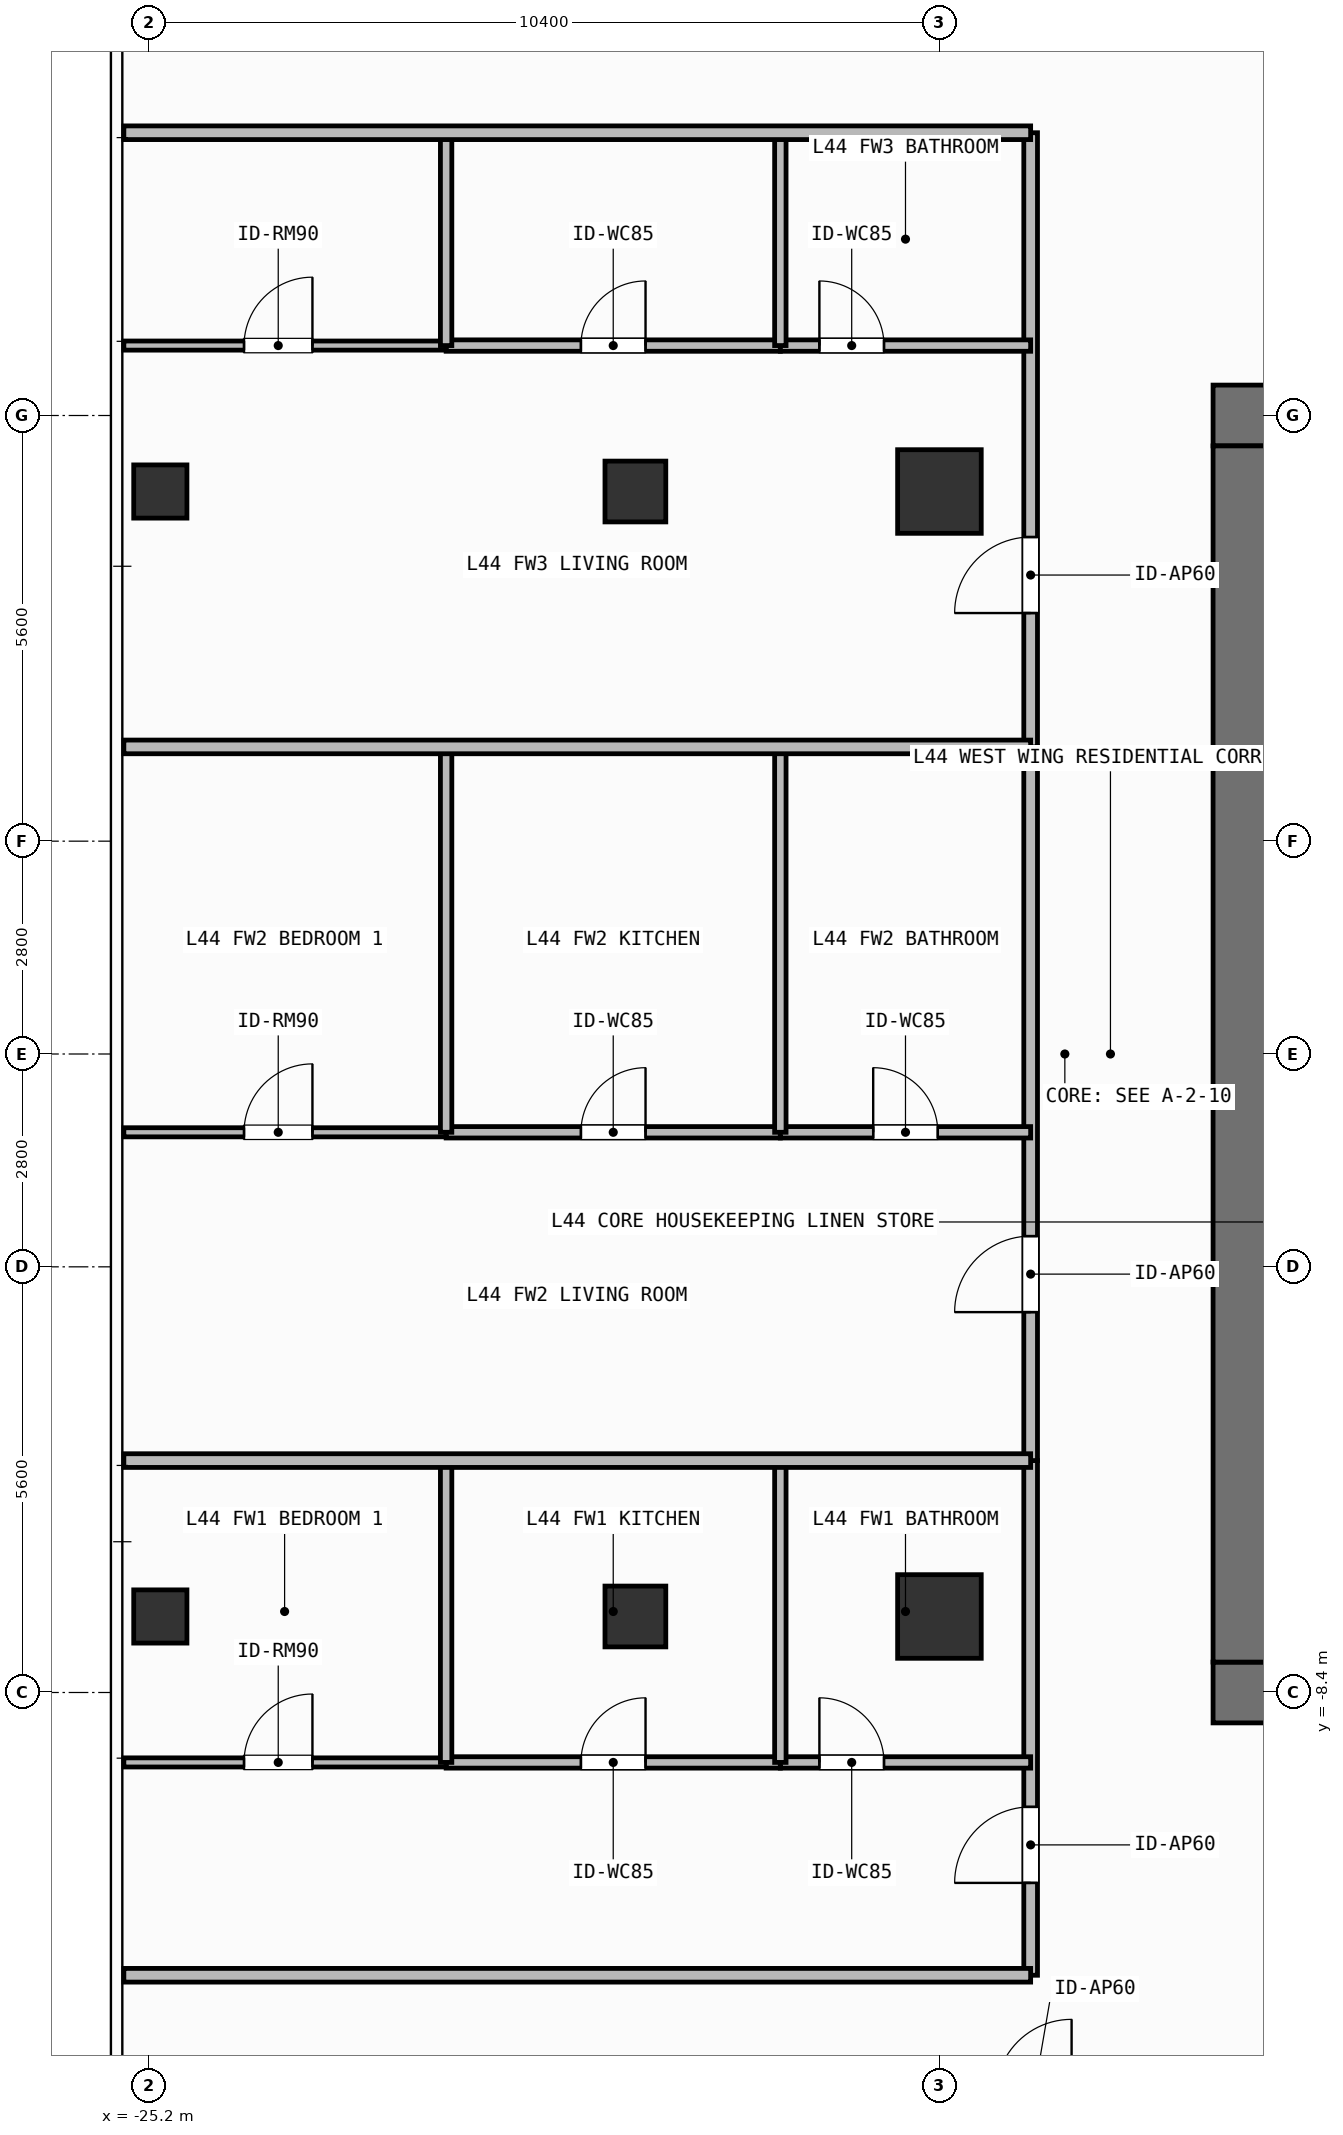
"""IFC4 building model, lengths in metres.
Left out: names, types, materials, properties, quantities, classifications, styles, units other than length and angle.
Written with IfcOpenShell. Run it as: python <this file> out.ifc"""

import sys

from ifc_helpers import new_model, si_unit, direction, frame, frame_2d, origin, origin_2d, place, context, subcontext, project, spatial, rectangle, hollow_rectangle, extrude, element, fill, save


model = new_model("IFC4")
c1 = context("Model", 3, precision=1e-05, world=origin(), true_north=direction((0.0, 1.0)))
c2 = subcontext(c1, "Body", "Model", "MODEL_VIEW")
j1 = project(units=[si_unit("LENGTHUNIT", "METRE"), si_unit("PLANEANGLEUNIT", "RADIAN")], contexts=[c1])
p1 = place(None, origin())
s1 = spatial("IfcSite", under=j1, at=p1, CompositionType="ELEMENT")
p2 = place(p1, origin())
s2 = spatial("IfcBuilding", under=s1, at=p2, CompositionType="ELEMENT")
p3 = place(p2, frame((0.0, 0.0, 179.7)))
s3 = spatial("IfcBuildingStorey", under=s2, at=p3, CompositionType="ELEMENT", Elevation=179.7)
for number, where, z_axis, x_axis in (
    (1, (-11.2, -8.4, 0.0), (0.0, 0.0, 1.0), (1.0, 0.0, 0.0)),
    (2, (-11.2, 8.4, 0.0), (0.0, 0.0, 1.0), (1.0, 0.0, 0.0)),
):
    element("IfcWall", number, at=place(p3, frame(where, z_axis=z_axis, x_axis=x_axis)), inside=s3, PredefinedType="SHEAR", context=c2, shape_type="SweptSolid", body=[
        extrude(rectangle(XDim=1.5, YDim=0.8, at=frame_2d((0.75, 0.0))), origin(), (0.0, 0.0, 1.0), 3.9),
    ])
p4 = place(p3, frame((-10.8, -8.0, 0.0), z_axis=(0.0, 0.0, 1.0), x_axis=(0.0, 1.0, 0.0)))
e3 = element("IfcWall", 3, at=p4, inside=s3, PredefinedType="SHEAR", context=c2, shape_type="SweptSolid", body=[
    extrude(rectangle(XDim=16.0, YDim=0.8, at=frame_2d((8.0, 0.0))), origin(), (0.0, 0.0, 1.0), 3.9),
])
for number, where, z_axis, x_axis in (
    (4, (-14.8, -7.4, 0.0), (0.0, 0.0, 1.0), (1.0, 0.0, 0.0)),
    (5, (-14.8, 7.4, 0.0), (0.0, 0.0, 1.0), (1.0, 0.0, 0.0)),
):
    element("IfcColumn", number, at=place(p3, frame(where, z_axis=z_axis, x_axis=x_axis)), inside=s3, PredefinedType="COLUMN", context=c2, shape_type="SweptSolid", body=[
        extrude(rectangle(XDim=1.1, YDim=1.1, at=origin_2d()), origin(), (0.0, 0.0, 1.0), 3.9),
    ])
for number, where, z_axis, x_axis in (
    (6, (-18.8, -7.4, 0.0), (0.0, 0.0, 1.0), (1.0, 0.0, 0.0)),
    (7, (-18.8, 7.4, 0.0), (0.0, 0.0, 1.0), (1.0, 0.0, 0.0)),
):
    element("IfcColumn", number, at=place(p3, frame(where, z_axis=z_axis, x_axis=x_axis)), inside=s3, PredefinedType="COLUMN", context=c2, shape_type="SweptSolid", body=[
        extrude(hollow_rectangle(XDim=0.8, YDim=0.8, WallThickness=0.036, at=origin_2d()), origin(), (0.0, 0.0, 1.0), 3.9),
    ])
for number, where, z_axis, x_axis in (
    (8, (-25.05, -7.4, 0.0), (0.0, 0.0, 1.0), (1.0, 0.0, 0.0)),
    (9, (-25.05, 7.4, 0.0), (0.0, 0.0, 1.0), (1.0, 0.0, 0.0)),
):
    element("IfcColumn", number, at=place(p3, frame(where, z_axis=z_axis, x_axis=x_axis)), inside=s3, PredefinedType="COLUMN", context=c2, shape_type="SweptSolid", body=[
        extrude(hollow_rectangle(XDim=0.7, YDim=0.7, WallThickness=0.032, at=origin_2d()), origin(), (0.0, 0.0, 1.0), 3.9),
    ])
p5 = place(p3, frame((-13.6, -12.12, 0.0), z_axis=(0.0, 0.0, 1.0), x_axis=(0.0, 1.0, 0.0)))
e10 = element("IfcWall", 10, at=p5, inside=s3, PredefinedType="PARTITIONING", context=c2, shape_type="SweptSolid", body=[
    extrude(rectangle(XDim=6.771, YDim=0.18, at=frame_2d((3.385, 0.0))), origin(), (0.0, 0.0, 1.0), 3.68),
])
p6 = place(p5, frame((1.215, 0.0, 0.0)))
e11 = element("IfcOpeningElement", 11, at=p6, cuts=e10, PredefinedType="OPENING", context=c2, shape_type="SweptSolid", body=[
    extrude(rectangle(XDim=1.0, YDim=2.2, at=frame_2d((0.5, 1.1))), frame((0.0, 0.1, 0.0), z_axis=(0.0, -1.0, 0.0), x_axis=(1.0, 0.0, 0.0)), (0.0, 0.0, 1.0), 0.2),
])
p7 = place(p3, frame((-21.29, -9.32, 0.0), z_axis=(0.0, 0.0, 1.0), x_axis=(1.0, 0.0, 0.0)))
e12 = element("IfcWall", 12, at=p7, inside=s3, PredefinedType="PARTITIONING", context=c2, shape_type="SweptSolid", body=[
    extrude(rectangle(XDim=4.397, YDim=0.15, at=frame_2d((2.198, 0.0))), origin(), (0.0, 0.0, 1.0), 3.68),
])
p8 = place(p7, frame((1.773, 0.0, 0.0)))
e13 = element("IfcOpeningElement", 13, at=p8, cuts=e12, PredefinedType="OPENING", context=c2, shape_type="SweptSolid", body=[
    extrude(rectangle(XDim=0.85, YDim=2.1, at=frame_2d((0.425, 1.05))), frame((0.0, 0.085, 0.0), z_axis=(0.0, -1.0, 0.0), x_axis=(1.0, 0.0, 0.0)), (0.0, 0.0, 1.0), 0.17),
])
p9 = place(p3, frame((-16.893, -9.32, 0.0), z_axis=(0.0, 0.0, 1.0), x_axis=(1.0, 0.0, 0.0)))
e14 = element("IfcWall", 14, at=p9, inside=s3, PredefinedType="PARTITIONING", context=c2, shape_type="SweptSolid", body=[
    extrude(rectangle(XDim=3.293, YDim=0.15, at=frame_2d((1.646, 0.0))), origin(), (0.0, 0.0, 1.0), 3.68),
])
p10 = place(p9, frame((0.514, 0.0, 0.0)))
e15 = element("IfcOpeningElement", 15, at=p10, cuts=e14, PredefinedType="OPENING", context=c2, shape_type="SweptSolid", body=[
    extrude(rectangle(XDim=0.85, YDim=2.1, at=frame_2d((0.425, 1.05))), frame((0.0, 0.085, 0.0), z_axis=(0.0, -1.0, 0.0), x_axis=(1.0, 0.0, 0.0)), (0.0, 0.0, 1.0), 0.17),
])
p11 = place(p3, frame((-25.53, -9.32, 0.0), z_axis=(0.0, 0.0, 1.0), x_axis=(1.0, 0.0, 0.0)))
e16 = element("IfcWall", 16, at=p11, inside=s3, PredefinedType="PARTITIONING", context=c2, shape_type="SweptSolid", body=[
    extrude(rectangle(XDim=4.24, YDim=0.12, at=frame_2d((2.12, 0.0))), origin(), (0.0, 0.0, 1.0), 3.68),
])
p12 = place(p11, frame((1.581, 0.0, 0.0)))
e17 = element("IfcOpeningElement", 17, at=p12, cuts=e16, PredefinedType="OPENING", context=c2, shape_type="SweptSolid", body=[
    extrude(rectangle(XDim=0.9, YDim=2.1, at=frame_2d((0.45, 1.05))), frame((0.0, 0.07, 0.0), z_axis=(0.0, -1.0, 0.0), x_axis=(1.0, 0.0, 0.0)), (0.0, 0.0, 1.0), 0.14),
])
p13 = place(p3, frame((-13.6, -5.349, 0.0), z_axis=(0.0, 0.0, 1.0), x_axis=(0.0, 1.0, 0.0)))
e18 = element("IfcWall", 18, at=p13, inside=s3, PredefinedType="PARTITIONING", context=c2, shape_type="SweptSolid", body=[
    extrude(rectangle(XDim=9.389, YDim=0.18, at=frame_2d((4.695, 0.0))), origin(), (0.0, 0.0, 1.0), 3.68),
])
p14 = place(p13, frame((1.953, 0.0, 0.0)))
e19 = element("IfcOpeningElement", 19, at=p14, cuts=e18, PredefinedType="OPENING", context=c2, shape_type="SweptSolid", body=[
    extrude(rectangle(XDim=1.0, YDim=2.2, at=frame_2d((0.5, 1.1))), frame((0.0, 0.1, 0.0), z_axis=(0.0, -1.0, 0.0), x_axis=(1.0, 0.0, 0.0)), (0.0, 0.0, 1.0), 0.2),
])
p15 = place(p3, frame((-21.29, -1.03, 0.0), z_axis=(0.0, 0.0, 1.0), x_axis=(1.0, 0.0, 0.0)))
e20 = element("IfcWall", 20, at=p15, inside=s3, PredefinedType="PARTITIONING", context=c2, shape_type="SweptSolid", body=[
    extrude(rectangle(XDim=4.397, YDim=0.15, at=frame_2d((2.198, 0.0))), origin(), (0.0, 0.0, 1.0), 3.68),
])
p16 = place(p15, frame((1.773, 0.0, 0.0)))
e21 = element("IfcOpeningElement", 21, at=p16, cuts=e20, PredefinedType="OPENING", context=c2, shape_type="SweptSolid", body=[
    extrude(rectangle(XDim=0.85, YDim=2.1, at=frame_2d((0.425, 1.05))), frame((0.0, 0.085, 0.0), z_axis=(0.0, -1.0, 0.0), x_axis=(1.0, 0.0, 0.0)), (0.0, 0.0, 1.0), 0.17),
])
p17 = place(p3, frame((-16.893, -1.03, 0.0), z_axis=(0.0, 0.0, 1.0), x_axis=(1.0, 0.0, 0.0)))
e22 = element("IfcWall", 22, at=p17, inside=s3, PredefinedType="PARTITIONING", context=c2, shape_type="SweptSolid", body=[
    extrude(rectangle(XDim=3.293, YDim=0.15, at=frame_2d((1.646, 0.0))), origin(), (0.0, 0.0, 1.0), 3.68),
])
p18 = place(p17, frame((1.221, 0.0, 0.0)))
e23 = element("IfcOpeningElement", 23, at=p18, cuts=e22, PredefinedType="OPENING", context=c2, shape_type="SweptSolid", body=[
    extrude(rectangle(XDim=0.85, YDim=2.1, at=frame_2d((0.425, 1.05))), frame((0.0, 0.085, 0.0), z_axis=(0.0, -1.0, 0.0), x_axis=(1.0, 0.0, 0.0)), (0.0, 0.0, 1.0), 0.17),
])
p19 = place(p3, frame((-25.53, -1.03, 0.0), z_axis=(0.0, 0.0, 1.0), x_axis=(1.0, 0.0, 0.0)))
e24 = element("IfcWall", 24, at=p19, inside=s3, PredefinedType="PARTITIONING", context=c2, shape_type="SweptSolid", body=[
    extrude(rectangle(XDim=4.24, YDim=0.12, at=frame_2d((2.12, 0.0))), origin(), (0.0, 0.0, 1.0), 3.68),
])
p20 = place(p19, frame((1.581, 0.0, 0.0)))
e25 = element("IfcOpeningElement", 25, at=p20, cuts=e24, PredefinedType="OPENING", context=c2, shape_type="SweptSolid", body=[
    extrude(rectangle(XDim=0.9, YDim=2.1, at=frame_2d((0.45, 1.05))), frame((0.0, 0.07, 0.0), z_axis=(0.0, -1.0, 0.0), x_axis=(1.0, 0.0, 0.0)), (0.0, 0.0, 1.0), 0.14),
])
p21 = place(p3, frame((-13.6, 4.04, 0.0), z_axis=(0.0, 0.0, 1.0), x_axis=(0.0, 1.0, 0.0)))
e26 = element("IfcWall", 26, at=p21, inside=s3, PredefinedType="PARTITIONING", context=c2, shape_type="SweptSolid", body=[
    extrude(rectangle(XDim=8.08, YDim=0.18, at=frame_2d((4.04, 0.0))), origin(), (0.0, 0.0, 1.0), 3.68),
])
p22 = place(p21, frame((1.761, 0.0, 0.0)))
e27 = element("IfcOpeningElement", 27, at=p22, cuts=e26, PredefinedType="OPENING", context=c2, shape_type="SweptSolid", body=[
    extrude(rectangle(XDim=1.0, YDim=2.2, at=frame_2d((0.5, 1.1))), frame((0.0, 0.1, 0.0), z_axis=(0.0, -1.0, 0.0), x_axis=(1.0, 0.0, 0.0)), (0.0, 0.0, 1.0), 0.2),
])
p23 = place(p3, frame((-21.29, 9.32, 0.0), z_axis=(0.0, 0.0, 1.0), x_axis=(1.0, 0.0, 0.0)))
e28 = element("IfcWall", 28, at=p23, inside=s3, PredefinedType="PARTITIONING", context=c2, shape_type="SweptSolid", body=[
    extrude(rectangle(XDim=4.397, YDim=0.15, at=frame_2d((2.198, 0.0))), origin(), (0.0, 0.0, 1.0), 3.68),
])
p24 = place(p23, frame((1.773, 0.0, 0.0)))
e29 = element("IfcOpeningElement", 29, at=p24, cuts=e28, PredefinedType="OPENING", context=c2, shape_type="SweptSolid", body=[
    extrude(rectangle(XDim=0.85, YDim=2.1, at=frame_2d((0.425, 1.05))), frame((0.0, 0.085, 0.0), z_axis=(0.0, -1.0, 0.0), x_axis=(1.0, 0.0, 0.0)), (0.0, 0.0, 1.0), 0.17),
])
p25 = place(p3, frame((-16.893, 9.32, 0.0), z_axis=(0.0, 0.0, 1.0), x_axis=(1.0, 0.0, 0.0)))
e30 = element("IfcWall", 30, at=p25, inside=s3, PredefinedType="PARTITIONING", context=c2, shape_type="SweptSolid", body=[
    extrude(rectangle(XDim=3.293, YDim=0.15, at=frame_2d((1.646, 0.0))), origin(), (0.0, 0.0, 1.0), 3.68),
])
p26 = place(p25, frame((0.514, 0.0, 0.0)))
e31 = element("IfcOpeningElement", 31, at=p26, cuts=e30, PredefinedType="OPENING", context=c2, shape_type="SweptSolid", body=[
    extrude(rectangle(XDim=0.85, YDim=2.1, at=frame_2d((0.425, 1.05))), frame((0.0, 0.085, 0.0), z_axis=(0.0, -1.0, 0.0), x_axis=(1.0, 0.0, 0.0)), (0.0, 0.0, 1.0), 0.17),
])
p27 = place(p3, frame((-25.53, 9.32, 0.0), z_axis=(0.0, 0.0, 1.0), x_axis=(1.0, 0.0, 0.0)))
e32 = element("IfcWall", 32, at=p27, inside=s3, PredefinedType="PARTITIONING", context=c2, shape_type="SweptSolid", body=[
    extrude(rectangle(XDim=4.24, YDim=0.12, at=frame_2d((2.12, 0.0))), origin(), (0.0, 0.0, 1.0), 3.68),
])
p28 = place(p27, frame((1.581, 0.0, 0.0)))
e33 = element("IfcOpeningElement", 33, at=p28, cuts=e32, PredefinedType="OPENING", context=c2, shape_type="SweptSolid", body=[
    extrude(rectangle(XDim=0.9, YDim=2.1, at=frame_2d((0.45, 1.05))), frame((0.0, 0.07, 0.0), z_axis=(0.0, -1.0, 0.0), x_axis=(1.0, 0.0, 0.0)), (0.0, 0.0, 1.0), 0.14),
])
for number, where, z_axis, x_axis in (
    (34, (-16.893, -9.32, 0.0), (0.0, 0.0, 1.0), (0.0, 1.0, 0.0)),
    (35, (-21.29, -9.32, 0.0), (0.0, 0.0, 1.0), (0.0, 1.0, 0.0)),
):
    element("IfcWall", number, at=place(p3, frame(where, z_axis=z_axis, x_axis=x_axis)), inside=s3, PredefinedType="PARTITIONING", context=c2, shape_type="SweptSolid", body=[
        extrude(rectangle(XDim=3.971, YDim=0.15, at=frame_2d((1.985, 0.0))), origin(), (0.0, 0.0, 1.0), 3.68),
    ])
for number, where, z_axis, x_axis in (
    (36, (-16.893, -1.03, 0.0), (0.0, 0.0, 1.0), (0.0, 1.0, 0.0)),
    (37, (-21.29, -1.03, 0.0), (0.0, 0.0, 1.0), (0.0, 1.0, 0.0)),
):
    element("IfcWall", number, at=place(p3, frame(where, z_axis=z_axis, x_axis=x_axis)), inside=s3, PredefinedType="PARTITIONING", context=c2, shape_type="SweptSolid", body=[
        extrude(rectangle(XDim=5.07, YDim=0.15, at=frame_2d((2.535, 0.0))), origin(), (0.0, 0.0, 1.0), 3.68),
    ])
p29 = place(p3, frame((-25.53, -5.349, 0.0), z_axis=(0.0, 0.0, 1.0), x_axis=(1.0, 0.0, 0.0)))
e38 = element("IfcWall", 38, at=p29, inside=s3, PredefinedType="PARTITIONING", context=c2, shape_type="SweptSolid", body=[
    extrude(rectangle(XDim=11.93, YDim=0.18, at=frame_2d((5.965, 0.0))), origin(), (0.0, 0.0, 1.0), 3.68),
])
for number, where, z_axis, x_axis in (
    (39, (-16.893, 9.32, 0.0), (0.0, 0.0, 1.0), (0.0, 1.0, 0.0)),
    (40, (-21.29, 9.32, 0.0), (0.0, 0.0, 1.0), (0.0, 1.0, 0.0)),
):
    element("IfcWall", number, at=place(p3, frame(where, z_axis=z_axis, x_axis=x_axis)), inside=s3, PredefinedType="PARTITIONING", context=c2, shape_type="SweptSolid", body=[
        extrude(rectangle(XDim=2.8, YDim=0.15, at=frame_2d((1.4, 0.0))), origin(), (0.0, 0.0, 1.0), 3.68),
    ])
for number, where, z_axis, x_axis in (
    (41, (-25.53, 4.04, 0.0), (0.0, 0.0, 1.0), (1.0, 0.0, 0.0)),
    (42, (-25.53, -12.12, 0.0), (0.0, 0.0, 1.0), (1.0, 0.0, 0.0)),
    (43, (-25.53, 12.12, 0.0), (0.0, 0.0, 1.0), (1.0, 0.0, 0.0)),
):
    element("IfcWall", number, at=place(p3, frame(where, z_axis=z_axis, x_axis=x_axis)), inside=s3, PredefinedType="PARTITIONING", context=c2, shape_type="SweptSolid", body=[
        extrude(rectangle(XDim=11.93, YDim=0.18, at=frame_2d((5.965, 0.0))), origin(), (0.0, 0.0, 1.0), 3.68),
    ])
p30 = place(p6, origin())
e44 = element("IfcDoor", 44, at=p30, inside=s3, OperationType="SINGLE_SWING_LEFT", PredefinedType="DOOR", context=c2, shape_type="SweptSolid", body=[
    extrude(rectangle(XDim=1.0, YDim=2.2, at=frame_2d((0.5, 1.1))), frame((0.0, 0.025, 0.0), z_axis=(0.0, -1.0, 0.0), x_axis=(1.0, 0.0, 0.0)), (0.0, 0.0, 1.0), 0.05),
])
fill(e11, e44)
p31 = place(p8, origin())
e45 = element("IfcDoor", 45, at=p31, inside=s3, OperationType="SINGLE_SWING_RIGHT", PredefinedType="DOOR", context=c2, shape_type="SweptSolid", body=[
    extrude(rectangle(XDim=0.85, YDim=2.1, at=frame_2d((0.425, 1.05))), frame((0.0, 0.025, 0.0), z_axis=(0.0, -1.0, 0.0), x_axis=(1.0, 0.0, 0.0)), (0.0, 0.0, 1.0), 0.05),
])
fill(e13, e45)
p32 = place(p10, origin())
e46 = element("IfcDoor", 46, at=p32, inside=s3, OperationType="SINGLE_SWING_LEFT", PredefinedType="DOOR", context=c2, shape_type="SweptSolid", body=[
    extrude(rectangle(XDim=0.85, YDim=2.1, at=frame_2d((0.425, 1.05))), frame((0.0, 0.025, 0.0), z_axis=(0.0, -1.0, 0.0), x_axis=(1.0, 0.0, 0.0)), (0.0, 0.0, 1.0), 0.05),
])
fill(e15, e46)
p33 = place(p12, origin())
e47 = element("IfcDoor", 47, at=p33, inside=s3, OperationType="SINGLE_SWING_RIGHT", PredefinedType="DOOR", context=c2, shape_type="SweptSolid", body=[
    extrude(rectangle(XDim=0.9, YDim=2.1, at=frame_2d((0.45, 1.05))), frame((0.0, 0.025, 0.0), z_axis=(0.0, -1.0, 0.0), x_axis=(1.0, 0.0, 0.0)), (0.0, 0.0, 1.0), 0.05),
])
fill(e17, e47)
p34 = place(p14, origin())
e48 = element("IfcDoor", 48, at=p34, inside=s3, OperationType="SINGLE_SWING_LEFT", PredefinedType="DOOR", context=c2, shape_type="SweptSolid", body=[
    extrude(rectangle(XDim=1.0, YDim=2.2, at=frame_2d((0.5, 1.1))), frame((0.0, 0.025, 0.0), z_axis=(0.0, -1.0, 0.0), x_axis=(1.0, 0.0, 0.0)), (0.0, 0.0, 1.0), 0.05),
])
fill(e19, e48)
p35 = place(p16, origin())
e49 = element("IfcDoor", 49, at=p35, inside=s3, OperationType="SINGLE_SWING_RIGHT", PredefinedType="DOOR", context=c2, shape_type="SweptSolid", body=[
    extrude(rectangle(XDim=0.85, YDim=2.1, at=frame_2d((0.425, 1.05))), frame((0.0, 0.025, 0.0), z_axis=(0.0, -1.0, 0.0), x_axis=(1.0, 0.0, 0.0)), (0.0, 0.0, 1.0), 0.05),
])
fill(e21, e49)
p36 = place(p18, origin())
e50 = element("IfcDoor", 50, at=p36, inside=s3, OperationType="SINGLE_SWING_LEFT", PredefinedType="DOOR", context=c2, shape_type="SweptSolid", body=[
    extrude(rectangle(XDim=0.85, YDim=2.1, at=frame_2d((0.425, 1.05))), frame((0.0, 0.025, 0.0), z_axis=(0.0, -1.0, 0.0), x_axis=(1.0, 0.0, 0.0)), (0.0, 0.0, 1.0), 0.05),
])
fill(e23, e50)
p37 = place(p20, origin())
e51 = element("IfcDoor", 51, at=p37, inside=s3, OperationType="SINGLE_SWING_RIGHT", PredefinedType="DOOR", context=c2, shape_type="SweptSolid", body=[
    extrude(rectangle(XDim=0.9, YDim=2.1, at=frame_2d((0.45, 1.05))), frame((0.0, 0.025, 0.0), z_axis=(0.0, -1.0, 0.0), x_axis=(1.0, 0.0, 0.0)), (0.0, 0.0, 1.0), 0.05),
])
fill(e25, e51)
p38 = place(p22, origin())
e52 = element("IfcDoor", 52, at=p38, inside=s3, OperationType="SINGLE_SWING_LEFT", PredefinedType="DOOR", context=c2, shape_type="SweptSolid", body=[
    extrude(rectangle(XDim=1.0, YDim=2.2, at=frame_2d((0.5, 1.1))), frame((0.0, 0.025, 0.0), z_axis=(0.0, -1.0, 0.0), x_axis=(1.0, 0.0, 0.0)), (0.0, 0.0, 1.0), 0.05),
])
fill(e27, e52)
p39 = place(p24, origin())
e53 = element("IfcDoor", 53, at=p39, inside=s3, OperationType="SINGLE_SWING_RIGHT", PredefinedType="DOOR", context=c2, shape_type="SweptSolid", body=[
    extrude(rectangle(XDim=0.85, YDim=2.1, at=frame_2d((0.425, 1.05))), frame((0.0, 0.025, 0.0), z_axis=(0.0, -1.0, 0.0), x_axis=(1.0, 0.0, 0.0)), (0.0, 0.0, 1.0), 0.05),
])
fill(e29, e53)
p40 = place(p26, origin())
e54 = element("IfcDoor", 54, at=p40, inside=s3, OperationType="SINGLE_SWING_LEFT", PredefinedType="DOOR", context=c2, shape_type="SweptSolid", body=[
    extrude(rectangle(XDim=0.85, YDim=2.1, at=frame_2d((0.425, 1.05))), frame((0.0, 0.025, 0.0), z_axis=(0.0, -1.0, 0.0), x_axis=(1.0, 0.0, 0.0)), (0.0, 0.0, 1.0), 0.05),
])
fill(e31, e54)
p41 = place(p28, origin())
e55 = element("IfcDoor", 55, at=p41, inside=s3, OperationType="SINGLE_SWING_RIGHT", PredefinedType="DOOR", context=c2, shape_type="SweptSolid", body=[
    extrude(rectangle(XDim=0.9, YDim=2.1, at=frame_2d((0.45, 1.05))), frame((0.0, 0.025, 0.0), z_axis=(0.0, -1.0, 0.0), x_axis=(1.0, 0.0, 0.0)), (0.0, 0.0, 1.0), 0.05),
])
fill(e33, e55)
save(model, sys.argv[1])
